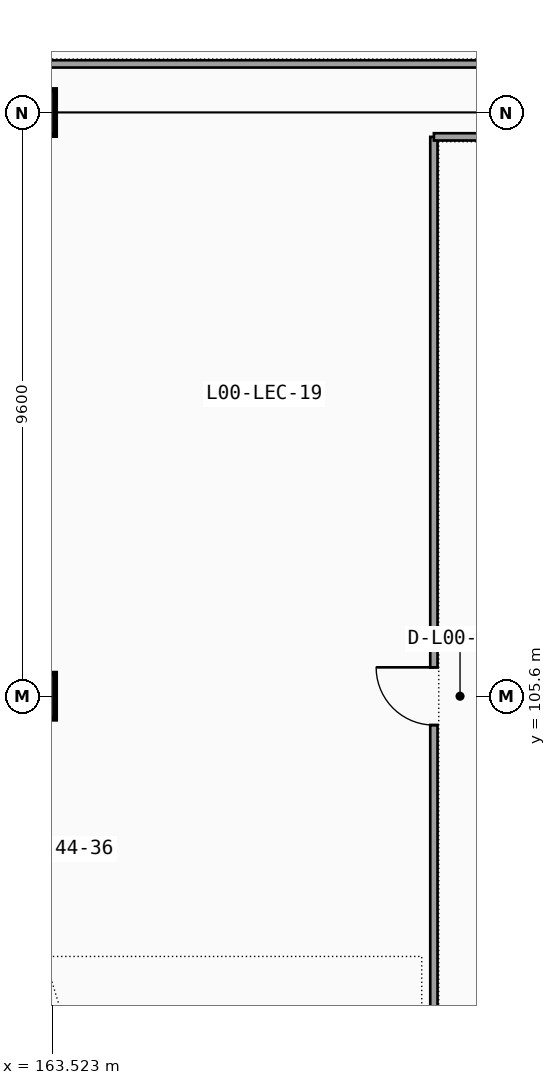
"""IFC4 building model, lengths in metres.
Left out: names, types, materials, properties, quantities, classifications, styles, units other than length and angle.
Written with IfcOpenShell. Run it as: python <this file> out.ifc"""

import sys

from ifc_helpers import new_model, si_unit, direction, frame, frame_2d, origin, origin_2d, place, context, subcontext, project, spatial, rectangle, extrude, element, fill, save


model = new_model("IFC4")
c1 = context("Model", 3, precision=1e-05, world=origin(), true_north=direction((0.0, 1.0)))
c2 = subcontext(c1, "Body", "Model", "MODEL_VIEW")
j1 = project(units=[si_unit("LENGTHUNIT", "METRE"), si_unit("PLANEANGLEUNIT", "RADIAN")], contexts=[c1])
p1 = place(None, origin())
s1 = spatial("IfcSite", under=j1, at=p1, CompositionType="ELEMENT")
p2 = place(p1, origin())
s2 = spatial("IfcBuilding", under=s1, at=p2, CompositionType="ELEMENT")
p3 = place(p2, origin())
s3 = spatial("IfcBuildingStorey", under=s2, at=p3, CompositionType="ELEMENT", Elevation=0.0)
for number, where, z_axis, x_axis in (
    (1, (163.2, 105.6, 0.0), (0.0, 0.0, 1.0), (1.0, 0.0, 0.0)),
    (2, (163.2, 115.2, 0.0), (0.0, 0.0, 1.0), (1.0, 0.0, 0.0)),
):
    element("IfcColumn", number, at=place(p3, frame(where, z_axis=z_axis, x_axis=x_axis)), inside=s3, PredefinedType="COLUMN", context=c2, shape_type="SweptSolid", body=[
        extrude(rectangle(XDim=0.75, YDim=0.75, at=origin_2d()), origin(), (0.0, 0.0, 1.0), 4.8),
    ])
p4 = place(p3, frame((169.8, 96.4, 0.0), z_axis=(0.0, 0.0, 1.0), x_axis=(0.0, 1.0, 0.0)))
e3 = element("IfcWall", 3, at=p4, inside=s3, PredefinedType="PARTITIONING", context=c2, shape_type="SweptSolid", body=[
    extrude(rectangle(XDim=18.4, YDim=0.12, at=frame_2d((9.2, 0.0))), origin(), (0.0, 0.0, 1.0), 3.664),
])
p5 = place(p4, frame((8.725, 0.0, 0.0), z_axis=(0.0, 0.0, 1.0), x_axis=(1.0, 0.0, 0.0)))
e4 = element("IfcOpeningElement", 4, at=p5, cuts=e3, PredefinedType="OPENING", context=c2, shape_type="SweptSolid", body=[
    extrude(rectangle(XDim=0.95, YDim=2.15, at=frame_2d((0.475, 1.075))), frame((0.0, 0.07, 0.0), z_axis=(0.0, -1.0, 0.0), x_axis=(1.0, 0.0, 0.0)), (0.0, 0.0, 1.0), 0.14),
])
p6 = place(p3, frame((169.8, 114.8, 0.0), z_axis=(0.0, 0.0, 1.0), x_axis=(1.0, 0.0, 0.0)))
e5 = element("IfcWall", 5, at=p6, inside=s3, PredefinedType="PARTITIONING", context=c2, shape_type="SweptSolid", body=[
    extrude(rectangle(XDim=2.593, YDim=0.12, at=frame_2d((1.296, 0.0))), origin(), (0.0, 0.0, 1.0), 4.5),
])
p7 = place(p3, frame((191.5, 116.0, 0.0), z_axis=(0.0, 0.0, 1.0), x_axis=(-1.0, 0.0, 0.0)))
e6 = element("IfcWall", 6, at=p7, inside=s3, PredefinedType="PARTITIONING", context=c2, shape_type="SweptSolid", body=[
    extrude(rectangle(XDim=29.0, YDim=0.12, at=frame_2d((14.5, 0.0))), origin(), (0.0, 0.0, 1.0), 3.573),
])
p8 = place(p7, frame((3.825, 0.0, 0.0), z_axis=(0.0, 0.0, 1.0), x_axis=(1.0, 0.0, 0.0)))
e7 = element("IfcOpeningElement", 7, at=p8, cuts=e6, PredefinedType="OPENING", context=c2, shape_type="SweptSolid", body=[
    extrude(rectangle(XDim=0.95, YDim=2.15, at=frame_2d((0.475, 1.075))), frame((0.0, 0.07, 0.0), z_axis=(0.0, -1.0, 0.0), x_axis=(1.0, 0.0, 0.0)), (0.0, 0.0, 1.0), 0.14),
])
p9 = place(p5, origin())
e8 = element("IfcDoor", 8, at=p9, inside=s3, OperationType="SINGLE_SWING_RIGHT", PredefinedType="DOOR", context=c2, shape_type="SweptSolid", body=[
    extrude(rectangle(XDim=0.95, YDim=2.15, at=frame_2d((0.475, 1.075))), frame((0.0, 0.025, 0.0), z_axis=(0.0, -1.0, 0.0), x_axis=(1.0, 0.0, 0.0)), (0.0, 0.0, 1.0), 0.05),
])
fill(e4, e8)
save(model, sys.argv[1])
